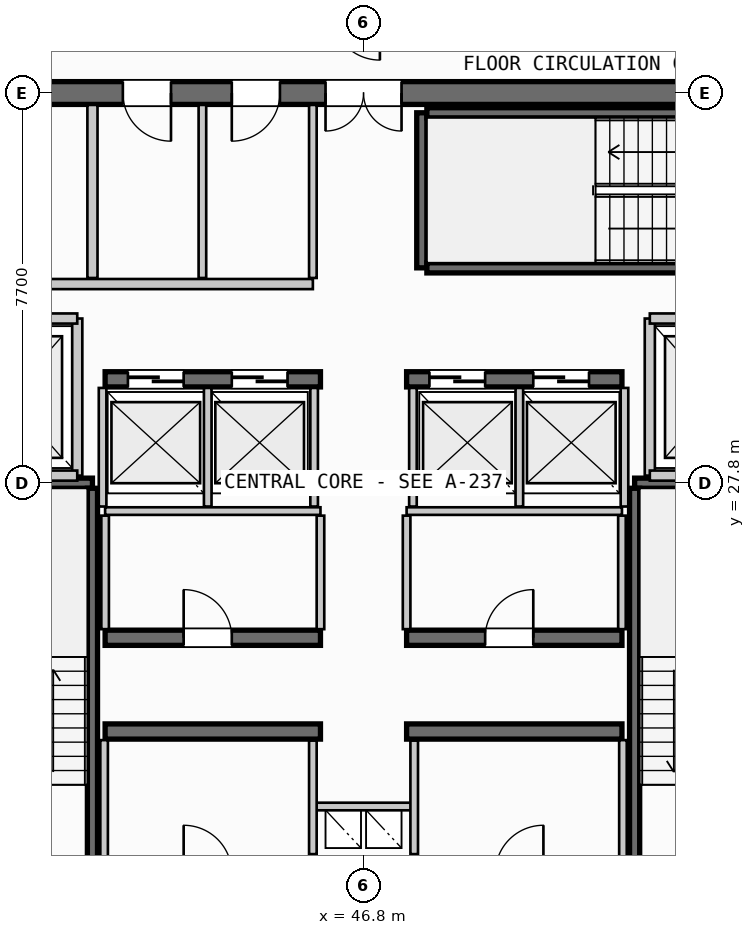
"""IFC4 building model, lengths in metres.
Left out: names, types, materials, properties, quantities, classifications, styles, units other than length and angle.
Written with IfcOpenShell. Run it as: python <this file> out.ifc"""

import sys

from ifc_helpers import new_model, si_unit, direction, frame, frame_2d, origin, place, context, subcontext, project, spatial, rectangle, extrude, source, transform, mapped, element, fill, save


model = new_model("IFC4")
c1 = context("Model", 3, precision=1e-05, world=origin(), true_north=direction((0.0, 1.0)))
c2 = subcontext(c1, "Body", "Model", "MODEL_VIEW")
j1 = project(units=[si_unit("LENGTHUNIT", "METRE"), si_unit("PLANEANGLEUNIT", "RADIAN")], contexts=[c1])
p1 = place(None, origin())
s1 = spatial("IfcSite", under=j1, at=p1, CompositionType="ELEMENT")
p2 = place(p1, origin())
s2 = spatial("IfcBuilding", under=s1, at=p2, CompositionType="ELEMENT")
p3 = place(p2, frame((0.0, 0.0, 266.35)))
s3 = spatial("IfcBuildingStorey", under=s2, at=p3, CompositionType="ELEMENT", Elevation=266.35)
p4 = place(p3, frame((55.6, 35.5, 0.0), z_axis=(0.0, 0.0, 1.0), x_axis=(-1.0, 0.0, 0.0)))
e1 = element("IfcWall", 1, at=p4, inside=s3, PredefinedType="SHEAR", context=c2, shape_type="SweptSolid", body=[
    extrude(rectangle(XDim=17.6, YDim=0.45, at=frame_2d((8.8, 0.0))), origin(), (0.0, 0.0, 1.0), 3.21),
])
p5 = place(p4, frame((8.05, 0.0, 0.0)))
e2 = element("IfcOpeningElement", 2, at=p5, cuts=e1, PredefinedType="OPENING", context=c2, shape_type="SweptSolid", body=[
    extrude(rectangle(XDim=1.5, YDim=2.2, at=frame_2d((0.75, 1.1))), frame((0.0, 0.235, 0.0), z_axis=(0.0, -1.0, 0.0), x_axis=(1.0, 0.0, 0.0)), (0.0, 0.0, 1.0), 0.47),
])
p6 = place(p4, frame((15.1, 0.0, 0.0)))
e3 = element("IfcOpeningElement", 3, at=p6, cuts=e1, PredefinedType="OPENING", context=c2, shape_type="SweptSolid", body=[
    extrude(rectangle(XDim=0.95, YDim=2.15, at=frame_2d((0.475, 1.075))), frame((0.0, 0.235, 0.0), z_axis=(0.0, -1.0, 0.0), x_axis=(1.0, 0.0, 0.0)), (0.0, 0.0, 1.0), 0.47),
])
p7 = place(p4, frame((12.6, 0.0, 0.0)))
e4 = element("IfcOpeningElement", 4, at=p7, cuts=e1, PredefinedType="OPENING", context=c2, shape_type="SweptSolid", body=[
    extrude(rectangle(XDim=0.95, YDim=2.15, at=frame_2d((0.475, 1.075))), frame((0.0, 0.235, 0.0), z_axis=(0.0, -1.0, 0.0), x_axis=(1.0, 0.0, 0.0)), (0.0, 0.0, 1.0), 0.47),
])
p8 = place(p4, frame((10.45, 0.0, 0.0)))
e5 = element("IfcOpeningElement", 5, at=p8, cuts=e1, PredefinedType="OPENING", context=c2, shape_type="SweptSolid", body=[
    extrude(rectangle(XDim=0.95, YDim=2.15, at=frame_2d((0.475, 1.075))), frame((0.0, 0.235, 0.0), z_axis=(0.0, -1.0, 0.0), x_axis=(1.0, 0.0, 0.0)), (0.0, 0.0, 1.0), 0.47),
])
for number, where, z_axis, x_axis in (
    (6, (41.7, 22.9, 0.0), (0.0, 0.0, 1.0), (1.0, 0.0, 0.0)),
    (7, (47.65, 22.9, 0.0), (0.0, 0.0, 1.0), (1.0, 0.0, 0.0)),
):
    element("IfcWall", number, at=place(p3, frame(where, z_axis=z_axis, x_axis=x_axis)), inside=s3, PredefinedType="SHEAR", context=c2, shape_type="SweptSolid", body=[
        extrude(rectangle(XDim=4.25, YDim=0.3, at=frame_2d((2.125, 0.0))), origin(), (0.0, 0.0, 1.0), 3.21),
    ])
p9 = place(p3, frame((41.7, 24.75, 0.0), z_axis=(0.0, 0.0, 1.0), x_axis=(1.0, 0.0, 0.0)))
e8 = element("IfcWall", 8, at=p9, inside=s3, PredefinedType="SHEAR", context=c2, shape_type="SweptSolid", body=[
    extrude(rectangle(XDim=4.25, YDim=0.3, at=frame_2d((2.125, 0.0))), origin(), (0.0, 0.0, 1.0), 3.21),
])
p10 = place(p9, frame((1.55, 0.0, 0.0)))
e9 = element("IfcOpeningElement", 9, at=p10, cuts=e8, PredefinedType="OPENING", context=c2, shape_type="SweptSolid", body=[
    extrude(rectangle(XDim=0.95, YDim=2.15, at=frame_2d((0.475, 1.075))), frame((0.0, 0.16, 0.0), z_axis=(0.0, -1.0, 0.0), x_axis=(1.0, 0.0, 0.0)), (0.0, 0.0, 1.0), 0.32),
])
p11 = place(p3, frame((47.65, 24.75, 0.0), z_axis=(0.0, 0.0, 1.0), x_axis=(1.0, 0.0, 0.0)))
e10 = element("IfcWall", 10, at=p11, inside=s3, PredefinedType="SHEAR", context=c2, shape_type="SweptSolid", body=[
    extrude(rectangle(XDim=4.25, YDim=0.3, at=frame_2d((2.125, 0.0))), origin(), (0.0, 0.0, 1.0), 3.21),
])
p12 = place(p11, frame((1.55, 0.0, 0.0)))
e11 = element("IfcOpeningElement", 11, at=p12, cuts=e10, PredefinedType="OPENING", context=c2, shape_type="SweptSolid", body=[
    extrude(rectangle(XDim=0.95, YDim=2.15, at=frame_2d((0.475, 1.075))), frame((0.0, 0.16, 0.0), z_axis=(0.0, -1.0, 0.0), x_axis=(1.0, 0.0, 0.0)), (0.0, 0.0, 1.0), 0.32),
])
p13 = place(p3, frame((41.7, 29.85, 0.0), z_axis=(0.0, 0.0, 1.0), x_axis=(1.0, 0.0, 0.0)))
e12 = element("IfcWall", 12, at=p13, inside=s3, PredefinedType="SHEAR", context=c2, shape_type="SweptSolid", body=[
    extrude(rectangle(XDim=4.25, YDim=0.3, at=frame_2d((2.125, 0.0))), origin(), (0.0, 0.0, 1.0), 3.21),
])
p14 = place(p13, frame((0.45, 0.0, 0.0)))
e13 = element("IfcOpeningElement", 13, at=p14, cuts=e12, PredefinedType="OPENING", context=c2, shape_type="SweptSolid", body=[
    extrude(rectangle(XDim=1.1, YDim=2.2, at=frame_2d((0.55, 1.1))), frame((0.0, 0.16, 0.0), z_axis=(0.0, -1.0, 0.0), x_axis=(1.0, 0.0, 0.0)), (0.0, 0.0, 1.0), 0.32),
])
p15 = place(p13, frame((2.5, 0.0, 0.0)))
e14 = element("IfcOpeningElement", 14, at=p15, cuts=e12, PredefinedType="OPENING", context=c2, shape_type="SweptSolid", body=[
    extrude(rectangle(XDim=1.1, YDim=2.2, at=frame_2d((0.55, 1.1))), frame((0.0, 0.16, 0.0), z_axis=(0.0, -1.0, 0.0), x_axis=(1.0, 0.0, 0.0)), (0.0, 0.0, 1.0), 0.32),
])
p16 = place(p3, frame((47.65, 29.85, 0.0), z_axis=(0.0, 0.0, 1.0), x_axis=(1.0, 0.0, 0.0)))
e15 = element("IfcWall", 15, at=p16, inside=s3, PredefinedType="SHEAR", context=c2, shape_type="SweptSolid", body=[
    extrude(rectangle(XDim=4.25, YDim=0.3, at=frame_2d((2.125, 0.0))), origin(), (0.0, 0.0, 1.0), 3.21),
])
p17 = place(p16, frame((0.45, 0.0, 0.0)))
e16 = element("IfcOpeningElement", 16, at=p17, cuts=e15, PredefinedType="OPENING", context=c2, shape_type="SweptSolid", body=[
    extrude(rectangle(XDim=1.1, YDim=2.2, at=frame_2d((0.55, 1.1))), frame((0.0, 0.16, 0.0), z_axis=(0.0, -1.0, 0.0), x_axis=(1.0, 0.0, 0.0)), (0.0, 0.0, 1.0), 0.32),
])
p18 = place(p16, frame((2.5, 0.0, 0.0)))
e17 = element("IfcOpeningElement", 17, at=p18, cuts=e15, PredefinedType="OPENING", context=c2, shape_type="SweptSolid", body=[
    extrude(rectangle(XDim=1.1, YDim=2.2, at=frame_2d((0.55, 1.1))), frame((0.0, 0.16, 0.0), z_axis=(0.0, -1.0, 0.0), x_axis=(1.0, 0.0, 0.0)), (0.0, 0.0, 1.0), 0.32),
])
p19 = place(p3, frame((38.39, 27.8, 0.0), z_axis=(0.0, 0.0, 1.0), x_axis=(1.0, 0.0, 0.0)))
e18 = element("IfcWall", 18, at=p19, inside=s3, PredefinedType="SHEAR", context=c2, shape_type="SweptSolid", body=[
    extrude(rectangle(XDim=3.06, YDim=0.2, at=frame_2d((1.53, 0.0))), origin(), (0.0, 0.0, 1.0), 3.21),
])
p20 = place(p3, frame((41.45, 27.7, 0.0), z_axis=(0.0, 0.0, 1.0), x_axis=(0.0, -1.0, 0.0)))
e19 = element("IfcWall", 19, at=p20, inside=s3, PredefinedType="SHEAR", context=c2, shape_type="SweptSolid", body=[
    extrude(rectangle(XDim=7.35, YDim=0.2, at=frame_2d((3.675, 0.0))), origin(), (0.0, 0.0, 1.0), 3.21),
])
p21 = place(p3, frame((52.15, 27.8, 0.0), z_axis=(0.0, 0.0, 1.0), x_axis=(1.0, 0.0, 0.0)))
e20 = element("IfcWall", 20, at=p21, inside=s3, PredefinedType="SHEAR", context=c2, shape_type="SweptSolid", body=[
    extrude(rectangle(XDim=3.06, YDim=0.2, at=frame_2d((1.53, 0.0))), origin(), (0.0, 0.0, 1.0), 3.21),
])
p22 = place(p3, frame((52.15, 20.35, 0.0), z_axis=(0.0, 0.0, 1.0), x_axis=(0.0, 1.0, 0.0)))
e21 = element("IfcWall", 21, at=p22, inside=s3, PredefinedType="SHEAR", context=c2, shape_type="SweptSolid", body=[
    extrude(rectangle(XDim=7.35, YDim=0.2, at=frame_2d((3.675, 0.0))), origin(), (0.0, 0.0, 1.0), 3.21),
])
p23 = place(p3, frame((47.95, 32.05, 0.0), z_axis=(0.0, 0.0, 1.0), x_axis=(0.0, 1.0, 0.0)))
e22 = element("IfcWall", 22, at=p23, inside=s3, PredefinedType="SHEAR", context=c2, shape_type="SweptSolid", body=[
    extrude(rectangle(XDim=3.06, YDim=0.2, at=frame_2d((1.53, 0.0))), origin(), (0.0, 0.0, 1.0), 3.21),
])
for number, where, z_axis, x_axis in (
    (23, (48.05, 35.11, 0.0), (0.0, 0.0, 1.0), (1.0, 0.0, 0.0)),
    (24, (55.4, 32.05, 0.0), (0.0, 0.0, 1.0), (-1.0, 0.0, 0.0)),
):
    element("IfcWall", number, at=place(p3, frame(where, z_axis=z_axis, x_axis=x_axis)), inside=s3, PredefinedType="SHEAR", context=c2, shape_type="SweptSolid", body=[
        extrude(rectangle(XDim=7.35, YDim=0.2, at=frame_2d((3.675, 0.0))), origin(), (0.0, 0.0, 1.0), 3.21),
    ])
p24 = place(p3, frame((45.8, 21.42, 0.0), z_axis=(0.0, 0.0, 1.0), x_axis=(1.0, 0.0, 0.0)))
e25 = element("IfcWall", 25, at=p24, inside=s3, PredefinedType="PARTITIONING", context=c2, shape_type="SweptSolid", body=[
    extrude(rectangle(XDim=2.0, YDim=0.15, at=frame_2d((1.0, 0.0))), origin(), (0.0, 0.0, 1.0), 2.595),
])
for number, where, z_axis, x_axis in (
    (26, (45.8, 20.48, 0.0), (0.0, 0.0, 1.0), (0.0, 1.0, 0.0)),
    (27, (47.8, 20.48, 0.0), (0.0, 0.0, 1.0), (0.0, 1.0, 0.0)),
):
    element("IfcWall", number, at=place(p3, frame(where, z_axis=z_axis, x_axis=x_axis)), inside=s3, PredefinedType="PARTITIONING", context=c2, shape_type="SweptSolid", body=[
        extrude(rectangle(XDim=2.24, YDim=0.15, at=frame_2d((1.12, 0.0))), origin(), (0.0, 0.0, 1.0), 2.595),
    ])
p25 = place(p3, frame((41.15, 27.95, 0.0), z_axis=(0.0, 0.0, 1.0), x_axis=(0.0, 1.0, 0.0)))
e28 = element("IfcWall", 28, at=p25, inside=s3, PredefinedType="PARTITIONING", context=c2, shape_type="SweptSolid", body=[
    extrude(rectangle(XDim=3.1, YDim=0.2, at=frame_2d((1.55, 0.0))), origin(), (0.0, 0.0, 1.0), 2.595),
])
for number, where, z_axis, x_axis in (
    (29, (38.235, 27.95, 0.0), (0.0, 0.0, 1.0), (1.0, 0.0, 0.0)),
    (30, (38.235, 31.05, 0.0), (0.0, 0.0, 1.0), (1.0, 0.0, 0.0)),
):
    element("IfcWall", number, at=place(p3, frame(where, z_axis=z_axis, x_axis=x_axis)), inside=s3, PredefinedType="PARTITIONING", context=c2, shape_type="SweptSolid", body=[
        extrude(rectangle(XDim=2.915, YDim=0.2, at=frame_2d((1.458, 0.0))), origin(), (0.0, 0.0, 1.0), 2.595),
    ])
p26 = place(p3, frame((52.45, 27.95, 0.0), z_axis=(0.0, 0.0, 1.0), x_axis=(0.0, 1.0, 0.0)))
e31 = element("IfcWall", 31, at=p26, inside=s3, PredefinedType="PARTITIONING", context=c2, shape_type="SweptSolid", body=[
    extrude(rectangle(XDim=3.1, YDim=0.2, at=frame_2d((1.55, 0.0))), origin(), (0.0, 0.0, 1.0), 2.595),
])
for number, where, z_axis, x_axis in (
    (32, (52.45, 27.95, 0.0), (0.0, 0.0, 1.0), (1.0, 0.0, 0.0)),
    (33, (52.45, 31.05, 0.0), (0.0, 0.0, 1.0), (1.0, 0.0, 0.0)),
):
    element("IfcWall", number, at=place(p3, frame(where, z_axis=z_axis, x_axis=x_axis)), inside=s3, PredefinedType="PARTITIONING", context=c2, shape_type="SweptSolid", body=[
        extrude(rectangle(XDim=2.915, YDim=0.2, at=frame_2d((1.458, 0.0))), origin(), (0.0, 0.0, 1.0), 2.595),
    ])
for number, where, z_axis, x_axis in (
    (34, (41.68, 20.335, 0.0), (0.0, 0.0, 1.0), (0.0, 1.0, 0.0)),
    (35, (51.92, 20.335, 0.0), (0.0, 0.0, 1.0), (0.0, 1.0, 0.0)),
):
    element("IfcWall", number, at=place(p3, frame(where, z_axis=z_axis, x_axis=x_axis)), inside=s3, PredefinedType="PARTITIONING", context=c2, shape_type="SweptSolid", body=[
        extrude(rectangle(XDim=2.395, YDim=0.15, at=frame_2d((1.198, 0.0))), origin(), (0.0, 0.0, 1.0), 2.595),
    ])
for number, where, z_axis, x_axis in (
    (36, (41.7, 27.25, 0.0), (0.0, 0.0, 1.0), (1.0, 0.0, 0.0)),
    (37, (47.65, 27.25, 0.0), (0.0, 0.0, 1.0), (1.0, 0.0, 0.0)),
):
    element("IfcWall", number, at=place(p3, frame(where, z_axis=z_axis, x_axis=x_axis)), inside=s3, PredefinedType="PARTITIONING", context=c2, shape_type="SweptSolid", body=[
        extrude(rectangle(XDim=4.25, YDim=0.15, at=frame_2d((2.125, 0.0))), origin(), (0.0, 0.0, 1.0), 2.595),
    ])
for number, where, z_axis, x_axis in (
    (38, (41.7, 24.92, 0.0), (0.0, 0.0, 1.0), (0.0, 1.0, 0.0)),
    (39, (45.95, 24.92, 0.0), (0.0, 0.0, 1.0), (0.0, 1.0, 0.0)),
    (40, (47.65, 24.92, 0.0), (0.0, 0.0, 1.0), (0.0, 1.0, 0.0)),
    (41, (51.9, 24.92, 0.0), (0.0, 0.0, 1.0), (0.0, 1.0, 0.0)),
):
    element("IfcWall", number, at=place(p3, frame(where, z_axis=z_axis, x_axis=x_axis)), inside=s3, PredefinedType="PARTITIONING", context=c2, shape_type="SweptSolid", body=[
        extrude(rectangle(XDim=2.24, YDim=0.15, at=frame_2d((1.12, 0.0))), origin(), (0.0, 0.0, 1.0), 2.595),
    ])
for number, where, z_axis, x_axis in (
    (42, (41.65, 27.34, 0.0), (0.0, 0.0, 1.0), (0.0, 1.0, 0.0)),
    (43, (43.725, 27.34, 0.0), (0.0, 0.0, 1.0), (0.0, 1.0, 0.0)),
    (44, (45.825, 27.34, 0.0), (0.0, 0.0, 1.0), (0.0, 1.0, 0.0)),
    (45, (47.775, 27.34, 0.0), (0.0, 0.0, 1.0), (0.0, 1.0, 0.0)),
    (46, (49.875, 27.34, 0.0), (0.0, 0.0, 1.0), (0.0, 1.0, 0.0)),
    (47, (51.95, 27.34, 0.0), (0.0, 0.0, 1.0), (0.0, 1.0, 0.0)),
):
    element("IfcWall", number, at=place(p3, frame(where, z_axis=z_axis, x_axis=x_axis)), inside=s3, PredefinedType="PARTITIONING", context=c2, shape_type="SweptSolid", body=[
        extrude(rectangle(XDim=2.34, YDim=0.15, at=frame_2d((1.17, 0.0))), origin(), (0.0, 0.0, 1.0), 2.595),
    ])
p27 = place(p3, frame((41.45, 31.85, 0.0), z_axis=(0.0, 0.0, 1.0), x_axis=(0.0, 1.0, 0.0)))
e48 = element("IfcWall", 48, at=p27, inside=s3, PredefinedType="PARTITIONING", context=c2, shape_type="SweptSolid", body=[
    extrude(rectangle(XDim=3.415, YDim=0.2, at=frame_2d((1.708, 0.0))), origin(), (0.0, 0.0, 1.0), 2.595),
])
p28 = place(p3, frame((38.235, 31.73, 0.0), z_axis=(0.0, 0.0, 1.0), x_axis=(1.0, 0.0, 0.0)))
e49 = element("IfcWall", 49, at=p28, inside=s3, PredefinedType="PARTITIONING", context=c2, shape_type="SweptSolid", body=[
    extrude(rectangle(XDim=7.565, YDim=0.2, at=frame_2d((3.782, 0.0))), origin(), (0.0, 0.0, 1.0), 2.595),
])
p29 = place(p3, frame((45.8, 31.85, 0.0), z_axis=(0.0, 0.0, 1.0), x_axis=(0.0, 1.0, 0.0)))
e50 = element("IfcWall", 50, at=p29, inside=s3, PredefinedType="PARTITIONING", context=c2, shape_type="SweptSolid", body=[
    extrude(rectangle(XDim=3.415, YDim=0.15, at=frame_2d((1.708, 0.0))), origin(), (0.0, 0.0, 1.0), 2.595),
])
p30 = place(p3, frame((43.62, 31.85, 0.0), z_axis=(0.0, 0.0, 1.0), x_axis=(0.0, 1.0, 0.0)))
e51 = element("IfcWall", 51, at=p30, inside=s3, PredefinedType="PLUMBINGWALL", context=c2, shape_type="SweptSolid", body=[
    extrude(rectangle(XDim=3.415, YDim=0.15, at=frame_2d((1.708, 0.0))), origin(), (0.0, 0.0, 1.0), 2.595),
])
m1 = source(origin(), c2, "Body", "SweptSolid", [
    extrude(rectangle(XDim=1.5, YDim=2.2, at=frame_2d((0.75, 1.1))), frame((0.0, 0.025, 0.0), z_axis=(0.0, -1.0, 0.0), x_axis=(1.0, 0.0, 0.0)), (0.0, 0.0, 1.0), 0.05),
])
p31 = place(p5, origin())
e52 = element("IfcDoor", 52, at=p31, inside=s3, OperationType="DOUBLE_DOOR_SINGLE_SWING", PredefinedType="DOOR", context=c2, shape_type="MappedRepresentation", body=[
    mapped(m1, transform((0.0, 0.0, 0.0), scale=1.0)),
])
fill(e2, e52)
m2 = source(origin(), c2, "Body", "SweptSolid", [
    extrude(rectangle(XDim=0.95, YDim=2.15, at=frame_2d((0.475, 1.075))), frame((0.0, 0.025, 0.0), z_axis=(0.0, -1.0, 0.0), x_axis=(1.0, 0.0, 0.0)), (0.0, 0.0, 1.0), 0.05),
])
p32 = place(p10, origin())
e53 = element("IfcDoor", 53, at=p32, inside=s3, OperationType="SINGLE_SWING_LEFT", PredefinedType="DOOR", context=c2, shape_type="MappedRepresentation", body=[
    mapped(m2, transform((0.0, 0.0, 0.0), scale=1.0)),
])
fill(e9, e53)
p33 = place(p12, origin())
e54 = element("IfcDoor", 54, at=p33, inside=s3, OperationType="SINGLE_SWING_RIGHT", PredefinedType="DOOR", context=c2, shape_type="MappedRepresentation", body=[
    mapped(m2, transform((0.0, 0.0, 0.0), scale=1.0)),
])
fill(e11, e54)
m3 = source(origin(), c2, "Body", "SweptSolid", [
    extrude(rectangle(XDim=1.1, YDim=2.2, at=frame_2d((0.55, 1.1))), frame((0.0, 0.025, 0.0), z_axis=(0.0, -1.0, 0.0), x_axis=(1.0, 0.0, 0.0)), (0.0, 0.0, 1.0), 0.05),
])
p34 = place(p14, origin())
e55 = element("IfcDoor", 55, at=p34, inside=s3, OperationType="SLIDING_TO_LEFT", PredefinedType="DOOR", context=c2, shape_type="MappedRepresentation", body=[
    mapped(m3, transform((0.0, 0.0, 0.0), scale=1.0)),
])
fill(e13, e55)
p35 = place(p15, origin())
e56 = element("IfcDoor", 56, at=p35, inside=s3, OperationType="SLIDING_TO_LEFT", PredefinedType="DOOR", context=c2, shape_type="MappedRepresentation", body=[
    mapped(m3, transform((0.0, 0.0, 0.0), scale=1.0)),
])
fill(e14, e56)
p36 = place(p17, origin())
e57 = element("IfcDoor", 57, at=p36, inside=s3, OperationType="SLIDING_TO_LEFT", PredefinedType="DOOR", context=c2, shape_type="MappedRepresentation", body=[
    mapped(m3, transform((0.0, 0.0, 0.0), scale=1.0)),
])
fill(e16, e57)
p37 = place(p18, origin())
e58 = element("IfcDoor", 58, at=p37, inside=s3, OperationType="SLIDING_TO_LEFT", PredefinedType="DOOR", context=c2, shape_type="MappedRepresentation", body=[
    mapped(m3, transform((0.0, 0.0, 0.0), scale=1.0)),
])
fill(e17, e58)
p38 = place(p7, origin())
e59 = element("IfcDoor", 59, at=p38, inside=s3, OperationType="SINGLE_SWING_LEFT", PredefinedType="DOOR", context=c2, shape_type="MappedRepresentation", body=[
    mapped(m2, transform((0.0, 0.0, 0.0), scale=1.0)),
])
fill(e4, e59)
p39 = place(p8, origin())
e60 = element("IfcDoor", 60, at=p39, inside=s3, OperationType="SINGLE_SWING_RIGHT", PredefinedType="DOOR", context=c2, shape_type="MappedRepresentation", body=[
    mapped(m2, transform((0.0, 0.0, 0.0), scale=1.0)),
])
fill(e5, e60)
save(model, sys.argv[1])
